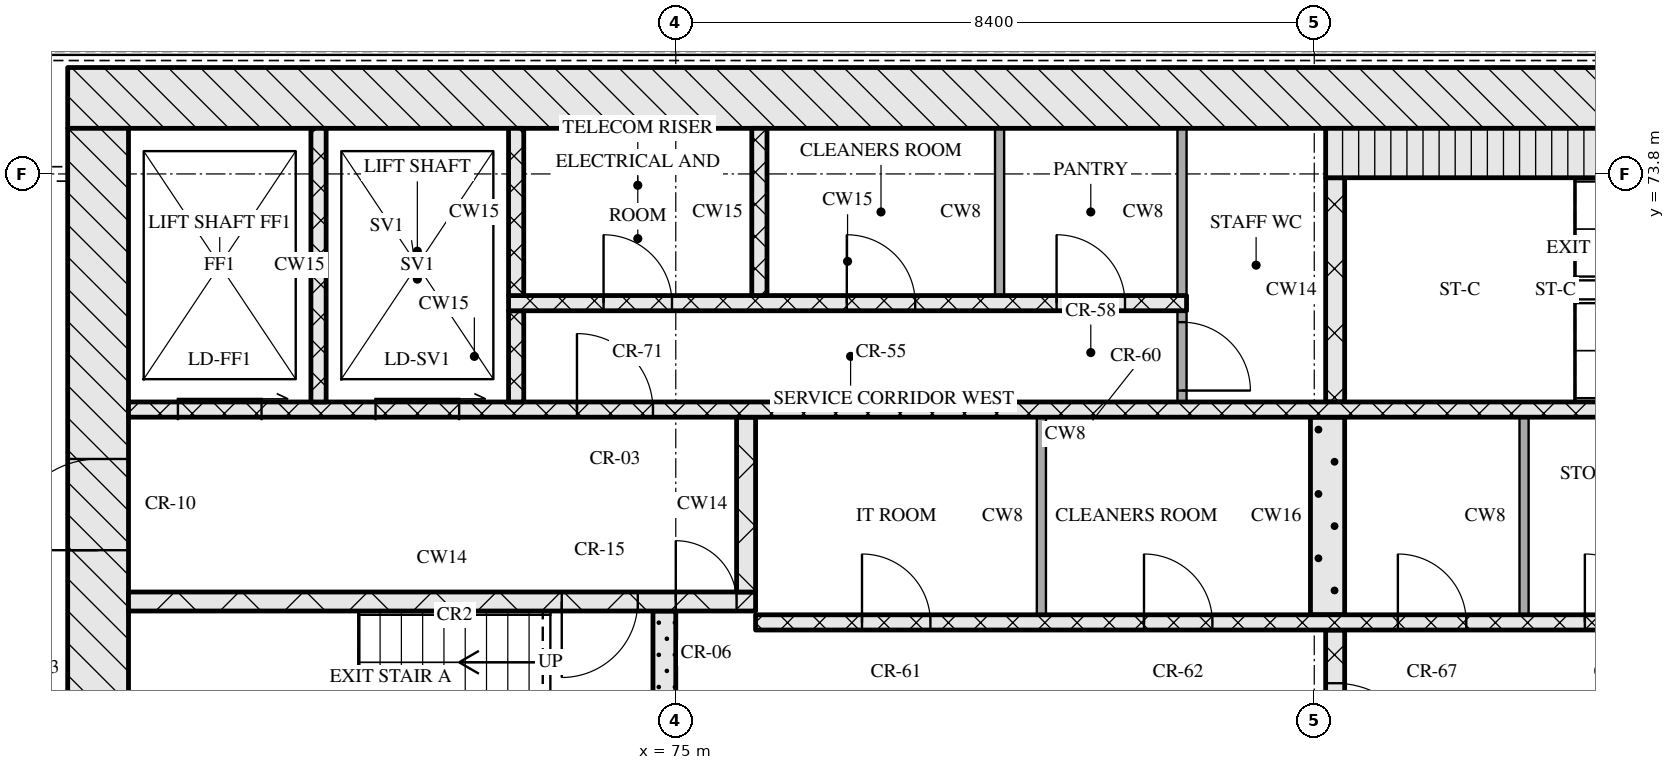
"""IFC4 building model, lengths in metres.
Left out: names, types, materials, properties, quantities, classifications, styles, units other than length and angle.
Written with IfcOpenShell. Run it as: python <this file> out.ifc"""

import sys

from ifc_helpers import new_model, si_unit, direction, frame, frame_2d, origin, place, context, subcontext, project, spatial, rectangle, extrude, element, fill, save


model = new_model("IFC4")
c1 = context("Model", 3, precision=1e-05, world=origin(), true_north=direction((0.0, 1.0)))
c2 = subcontext(c1, "Body", "Model", "MODEL_VIEW")
j1 = project(units=[si_unit("LENGTHUNIT", "METRE"), si_unit("PLANEANGLEUNIT", "RADIAN")], contexts=[c1])
p1 = place(None, origin())
s1 = spatial("IfcSite", under=j1, at=p1, CompositionType="ELEMENT")
p2 = place(p1, origin())
s2 = spatial("IfcBuilding", under=s1, at=p2, CompositionType="ELEMENT")
p3 = place(p2, frame((0.0, 0.0, 154.65)))
s3 = spatial("IfcBuildingStorey", under=s2, at=p3, CompositionType="ELEMENT", Elevation=154.65)
p4 = place(p3, frame((67.0, 74.8, 0.0), z_axis=(0.0, 0.0, 1.0), x_axis=(1.0, 0.0, 0.0)))
e1 = element("IfcWall", 1, at=p4, inside=s3, PredefinedType="SOLIDWALL", context=c2, shape_type="SweptSolid", body=[
    extrude(rectangle(XDim=41.2, YDim=0.8, at=frame_2d((20.6, 0.0))), origin(), (0.0, 0.0, 1.0), 3.32),
])
p5 = place(p3, frame((67.4, 62.4, 0.0), z_axis=(0.0, 0.0, 1.0), x_axis=(0.0, 1.0, 0.0)))
e2 = element("IfcWall", 2, at=p5, inside=s3, PredefinedType="SOLIDWALL", context=c2, shape_type="SweptSolid", body=[
    extrude(rectangle(XDim=12.0, YDim=0.8, at=frame_2d((6.0, 0.0))), origin(), (0.0, 0.0, 1.0), 3.32),
])
p6 = place(p5, frame((6.45, 0.0, 0.0)))
e3 = element("IfcOpeningElement", 3, at=p6, cuts=e2, PredefinedType="OPENING", context=c2, shape_type="SweptSolid", body=[
    extrude(rectangle(XDim=1.2, YDim=2.1, at=frame_2d((0.6, 1.05))), frame((0.0, 0.41, 0.0), z_axis=(0.0, -1.0, 0.0), x_axis=(1.0, 0.0, 0.0)), (0.0, 0.0, 1.0), 0.82),
])
p7 = place(p3, frame((74.85, 65.2, 0.0), z_axis=(0.0, 0.0, 1.0), x_axis=(0.0, 1.0, 0.0)))
e4 = element("IfcWall", 4, at=p7, inside=s3, PredefinedType="SOLIDWALL", context=c2, shape_type="SweptSolid", body=[
    extrude(rectangle(XDim=2.85, YDim=0.3, at=frame_2d((1.425, 0.0))), origin(), (0.0, 0.0, 1.0), 3.32),
])
p8 = place(p3, frame((83.675, 65.2, 0.0), z_axis=(0.0, 0.0, 1.0), x_axis=(0.0, 1.0, 0.0)))
e5 = element("IfcWall", 5, at=p8, inside=s3, PredefinedType="SOLIDWALL", context=c2, shape_type="SweptSolid", body=[
    extrude(rectangle(XDim=2.6, YDim=0.25, at=frame_2d((1.3, 0.0))), origin(), (0.0, 0.0, 1.0), 3.32),
])
p9 = place(p8, frame((0.7, 0.0, 0.0)))
e6 = element("IfcOpeningElement", 6, at=p9, cuts=e5, PredefinedType="OPENING", context=c2, shape_type="SweptSolid", body=[
    extrude(rectangle(XDim=1.2, YDim=2.1, at=frame_2d((0.6, 1.05))), frame((0.0, 0.135, 0.0), z_axis=(0.0, -1.0, 0.0), x_axis=(1.0, 0.0, 0.0)), (0.0, 0.0, 1.0), 0.27),
])
p10 = place(p3, frame((76.05, 67.9, 0.0), z_axis=(0.0, 0.0, 1.0), x_axis=(1.0, 0.0, 0.0)))
e7 = element("IfcWall", 7, at=p10, inside=s3, PredefinedType="SOLIDWALL", context=c2, shape_type="SweptSolid", body=[
    extrude(rectangle(XDim=23.1, YDim=0.2, at=frame_2d((11.55, 0.0))), origin(), (0.0, 0.0, 1.0), 3.32),
])
p11 = place(p10, frame((1.4, 0.0, 0.0)))
e8 = element("IfcOpeningElement", 8, at=p11, cuts=e7, PredefinedType="OPENING", context=c2, shape_type="SweptSolid", body=[
    extrude(rectangle(XDim=0.9, YDim=2.1, at=frame_2d((0.45, 1.05))), frame((0.0, 0.11, 0.0), z_axis=(0.0, -1.0, 0.0), x_axis=(1.0, 0.0, 0.0)), (0.0, 0.0, 1.0), 0.22),
])
p12 = place(p10, frame((5.11, 0.0, 0.0)))
e9 = element("IfcOpeningElement", 9, at=p12, cuts=e7, PredefinedType="OPENING", context=c2, shape_type="SweptSolid", body=[
    extrude(rectangle(XDim=0.9, YDim=2.1, at=frame_2d((0.45, 1.05))), frame((0.0, 0.11, 0.0), z_axis=(0.0, -1.0, 0.0), x_axis=(1.0, 0.0, 0.0)), (0.0, 0.0, 1.0), 0.22),
])
p13 = place(p10, frame((8.45, 0.0, 0.0)))
e10 = element("IfcOpeningElement", 10, at=p13, cuts=e7, PredefinedType="OPENING", context=c2, shape_type="SweptSolid", body=[
    extrude(rectangle(XDim=0.9, YDim=2.1, at=frame_2d((0.45, 1.05))), frame((0.0, 0.11, 0.0), z_axis=(0.0, -1.0, 0.0), x_axis=(1.0, 0.0, 0.0)), (0.0, 0.0, 1.0), 0.22),
])
p14 = place(p10, frame((10.91, 0.0, 0.0)))
e11 = element("IfcOpeningElement", 11, at=p14, cuts=e7, PredefinedType="OPENING", context=c2, shape_type="SweptSolid", body=[
    extrude(rectangle(XDim=0.9, YDim=2.1, at=frame_2d((0.45, 1.05))), frame((0.0, 0.11, 0.0), z_axis=(0.0, -1.0, 0.0), x_axis=(1.0, 0.0, 0.0)), (0.0, 0.0, 1.0), 0.22),
])
p15 = place(p10, frame((13.55, 0.0, 0.0)))
e12 = element("IfcOpeningElement", 12, at=p15, cuts=e7, PredefinedType="OPENING", context=c2, shape_type="SweptSolid", body=[
    extrude(rectangle(XDim=1.0, YDim=2.1, at=frame_2d((0.5, 1.05))), frame((0.0, 0.11, 0.0), z_axis=(0.0, -1.0, 0.0), x_axis=(1.0, 0.0, 0.0)), (0.0, 0.0, 1.0), 0.22),
])
p16 = place(p10, frame((16.2, 0.0, 0.0)))
e13 = element("IfcOpeningElement", 13, at=p16, cuts=e7, PredefinedType="OPENING", context=c2, shape_type="SweptSolid", body=[
    extrude(rectangle(XDim=1.1, YDim=2.1, at=frame_2d((0.55, 1.05))), frame((0.0, 0.11, 0.0), z_axis=(0.0, -1.0, 0.0), x_axis=(1.0, 0.0, 0.0)), (0.0, 0.0, 1.0), 0.22),
])
p17 = place(p10, frame((18.7, 0.0, 0.0)))
e14 = element("IfcOpeningElement", 14, at=p17, cuts=e7, PredefinedType="OPENING", context=c2, shape_type="SweptSolid", body=[
    extrude(rectangle(XDim=1.1, YDim=2.1, at=frame_2d((0.55, 1.05))), frame((0.0, 0.11, 0.0), z_axis=(0.0, -1.0, 0.0), x_axis=(1.0, 0.0, 0.0)), (0.0, 0.0, 1.0), 0.22),
])
p18 = place(p10, frame((21.2, 0.0, 0.0)))
e15 = element("IfcOpeningElement", 15, at=p18, cuts=e7, PredefinedType="OPENING", context=c2, shape_type="SweptSolid", body=[
    extrude(rectangle(XDim=1.1, YDim=2.1, at=frame_2d((0.55, 1.05))), frame((0.0, 0.11, 0.0), z_axis=(0.0, -1.0, 0.0), x_axis=(1.0, 0.0, 0.0)), (0.0, 0.0, 1.0), 0.22),
])
p19 = place(p3, frame((79.81, 68.0, 0.0), z_axis=(0.0, 0.0, 1.0), x_axis=(0.0, 1.0, 0.0)))
e16 = element("IfcWall", 16, at=p19, inside=s3, PredefinedType="PARTITIONING", context=c2, shape_type="SweptSolid", body=[
    extrude(rectangle(XDim=2.6, YDim=0.12, at=frame_2d((1.3, 0.0))), origin(), (0.0, 0.0, 1.0), 3.32),
])
p20 = place(p3, frame((83.575, 68.0, 0.0), z_axis=(0.0, 0.0, 1.0), x_axis=(0.0, 1.0, 0.0)))
e17 = element("IfcWall", 17, at=p20, inside=s3, PredefinedType="SOLIDWALL", context=c2, shape_type="SweptSolid", body=[
    extrude(rectangle(XDim=2.6, YDim=0.45, at=frame_2d((1.3, 0.0))), origin(), (0.0, 0.0, 1.0), 3.32),
])
p21 = place(p3, frame((86.16, 68.0, 0.0), z_axis=(0.0, 0.0, 1.0), x_axis=(0.0, 1.0, 0.0)))
e18 = element("IfcWall", 18, at=p21, inside=s3, PredefinedType="PARTITIONING", context=c2, shape_type="SweptSolid", body=[
    extrude(rectangle(XDim=2.6, YDim=0.12, at=frame_2d((1.3, 0.0))), origin(), (0.0, 0.0, 1.0), 3.32),
])
p22 = place(p3, frame((67.8, 68.175, 0.0), z_axis=(0.0, 0.0, 1.0), x_axis=(1.0, 0.0, 0.0)))
e19 = element("IfcWall", 19, at=p22, inside=s3, PredefinedType="SOLIDWALL", context=c2, shape_type="SweptSolid", body=[
    extrude(rectangle(XDim=8.25, YDim=0.25, at=frame_2d((4.125, 0.0))), origin(), (0.0, 0.0, 1.0), 3.32),
])
p23 = place(p22, frame((5.7, 0.0, 0.0)))
e20 = element("IfcOpeningElement", 20, at=p23, cuts=e19, PredefinedType="OPENING", context=c2, shape_type="SweptSolid", body=[
    extrude(rectangle(XDim=1.0, YDim=2.1, at=frame_2d((0.5, 1.05))), frame((0.0, 0.135, 0.0), z_axis=(0.0, -1.0, 0.0), x_axis=(1.0, 0.0, 0.0)), (0.0, 0.0, 1.0), 0.27),
])
p24 = place(p22, frame((7.2, 0.0, 0.0)))
e21 = element("IfcOpeningElement", 21, at=p24, cuts=e19, PredefinedType="OPENING", context=c2, shape_type="SweptSolid", body=[
    extrude(rectangle(XDim=0.8, YDim=2.1, at=frame_2d((0.4, 1.05))), frame((0.0, 0.135, 0.0), z_axis=(0.0, -1.0, 0.0), x_axis=(1.0, 0.0, 0.0)), (0.0, 0.0, 1.0), 0.27),
])
p25 = place(p3, frame((75.925, 68.3, 0.0), z_axis=(0.0, 0.0, 1.0), x_axis=(0.0, 1.0, 0.0)))
e22 = element("IfcWall", 22, at=p25, inside=s3, PredefinedType="SOLIDWALL", context=c2, shape_type="SweptSolid", body=[
    extrude(rectangle(XDim=2.3, YDim=0.25, at=frame_2d((1.15, 0.0))), origin(), (0.0, 0.0, 1.0), 3.32),
])
p26 = place(p3, frame((67.8, 70.7, 0.0), z_axis=(0.0, 0.0, 1.0), x_axis=(1.0, 0.0, 0.0)))
e23 = element("IfcWall", 23, at=p26, inside=s3, PredefinedType="SOLIDWALL", context=c2, shape_type="SweptSolid", body=[
    extrude(rectangle(XDim=39.6, YDim=0.2, at=frame_2d((19.8, 0.0))), origin(), (0.0, 0.0, 1.0), 3.32),
])
p27 = place(p26, frame((0.65, 0.0, 0.0)))
e24 = element("IfcOpeningElement", 24, at=p27, cuts=e23, PredefinedType="OPENING", context=c2, shape_type="SweptSolid", body=[
    extrude(rectangle(XDim=1.1, YDim=2.1, at=frame_2d((0.55, 1.05))), frame((0.0, 0.11, 0.0), z_axis=(0.0, -1.0, 0.0), x_axis=(1.0, 0.0, 0.0)), (0.0, 0.0, 1.0), 0.22),
])
p28 = place(p26, frame((3.25, 0.0, 0.0)))
e25 = element("IfcOpeningElement", 25, at=p28, cuts=e23, PredefinedType="OPENING", context=c2, shape_type="SweptSolid", body=[
    extrude(rectangle(XDim=1.1, YDim=2.1, at=frame_2d((0.55, 1.05))), frame((0.0, 0.11, 0.0), z_axis=(0.0, -1.0, 0.0), x_axis=(1.0, 0.0, 0.0)), (0.0, 0.0, 1.0), 0.22),
])
p29 = place(p26, frame((5.9, 0.0, 0.0)))
e26 = element("IfcOpeningElement", 26, at=p29, cuts=e23, PredefinedType="OPENING", context=c2, shape_type="SweptSolid", body=[
    extrude(rectangle(XDim=1.0, YDim=2.1, at=frame_2d((0.5, 1.05))), frame((0.0, 0.11, 0.0), z_axis=(0.0, -1.0, 0.0), x_axis=(1.0, 0.0, 0.0)), (0.0, 0.0, 1.0), 0.22),
])
p30 = place(p26, frame((21.7, 0.0, 0.0)))
e27 = element("IfcOpeningElement", 27, at=p30, cuts=e23, PredefinedType="OPENING", context=c2, shape_type="SweptSolid", body=[
    extrude(rectangle(XDim=1.0, YDim=2.1, at=frame_2d((0.5, 1.05))), frame((0.0, 0.11, 0.0), z_axis=(0.0, -1.0, 0.0), x_axis=(1.0, 0.0, 0.0)), (0.0, 0.0, 1.0), 0.22),
])
p31 = place(p26, frame((32.7, 0.0, 0.0)))
e28 = element("IfcOpeningElement", 28, at=p31, cuts=e23, PredefinedType="OPENING", context=c2, shape_type="SweptSolid", body=[
    extrude(rectangle(XDim=1.0, YDim=2.1, at=frame_2d((0.5, 1.05))), frame((0.0, 0.11, 0.0), z_axis=(0.0, -1.0, 0.0), x_axis=(1.0, 0.0, 0.0)), (0.0, 0.0, 1.0), 0.22),
])
p32 = place(p26, frame((35.25, 0.0, 0.0)))
e29 = element("IfcOpeningElement", 29, at=p32, cuts=e23, PredefinedType="OPENING", context=c2, shape_type="SweptSolid", body=[
    extrude(rectangle(XDim=1.1, YDim=2.1, at=frame_2d((0.55, 1.05))), frame((0.0, 0.11, 0.0), z_axis=(0.0, -1.0, 0.0), x_axis=(1.0, 0.0, 0.0)), (0.0, 0.0, 1.0), 0.22),
])
p33 = place(p26, frame((37.85, 0.0, 0.0)))
e30 = element("IfcOpeningElement", 30, at=p33, cuts=e23, PredefinedType="OPENING", context=c2, shape_type="SweptSolid", body=[
    extrude(rectangle(XDim=1.1, YDim=2.1, at=frame_2d((0.55, 1.05))), frame((0.0, 0.11, 0.0), z_axis=(0.0, -1.0, 0.0), x_axis=(1.0, 0.0, 0.0)), (0.0, 0.0, 1.0), 0.22),
])
p34 = place(p3, frame((70.3, 70.8, 0.0), z_axis=(0.0, 0.0, 1.0), x_axis=(0.0, 1.0, 0.0)))
e31 = element("IfcWall", 31, at=p34, inside=s3, PredefinedType="SOLIDWALL", context=c2, shape_type="SweptSolid", body=[
    extrude(rectangle(XDim=3.6, YDim=0.2, at=frame_2d((1.8, 0.0))), origin(), (0.0, 0.0, 1.0), 3.32),
])
p35 = place(p3, frame((72.9, 70.8, 0.0), z_axis=(0.0, 0.0, 1.0), x_axis=(0.0, 1.0, 0.0)))
e32 = element("IfcWall", 32, at=p35, inside=s3, PredefinedType="SOLIDWALL", context=c2, shape_type="SweptSolid", body=[
    extrude(rectangle(XDim=1.2, YDim=0.2, at=frame_2d((0.6, 0.0))), origin(), (0.0, 0.0, 1.0), 3.32),
])
p36 = place(p3, frame((81.66, 70.8, 0.0), z_axis=(0.0, 0.0, 1.0), x_axis=(0.0, 1.0, 0.0)))
e33 = element("IfcWall", 33, at=p36, inside=s3, PredefinedType="PARTITIONING", context=c2, shape_type="SweptSolid", body=[
    extrude(rectangle(XDim=1.2, YDim=0.12, at=frame_2d((0.6, 0.0))), origin(), (0.0, 0.0, 1.0), 3.32),
])
p37 = place(p36, frame((0.15, 0.0, 0.0)))
e34 = element("IfcOpeningElement", 34, at=p37, cuts=e33, PredefinedType="OPENING", context=c2, shape_type="SweptSolid", body=[
    extrude(rectangle(XDim=0.9, YDim=2.1, at=frame_2d((0.45, 1.05))), frame((0.0, 0.07, 0.0), z_axis=(0.0, -1.0, 0.0), x_axis=(1.0, 0.0, 0.0)), (0.0, 0.0, 1.0), 0.14),
])
p38 = place(p3, frame((83.675, 70.8, 0.0), z_axis=(0.0, 0.0, 1.0), x_axis=(0.0, 1.0, 0.0)))
e35 = element("IfcWall", 35, at=p38, inside=s3, PredefinedType="SOLIDWALL", context=c2, shape_type="SweptSolid", body=[
    extrude(rectangle(XDim=2.95, YDim=0.25, at=frame_2d((1.475, 0.0))), origin(), (0.0, 0.0, 1.0), 3.32),
])
p39 = place(p3, frame((72.8, 72.1, 0.0), z_axis=(0.0, 0.0, 1.0), x_axis=(1.0, 0.0, 0.0)))
e36 = element("IfcWall", 36, at=p39, inside=s3, PredefinedType="SOLIDWALL", context=c2, shape_type="SweptSolid", body=[
    extrude(rectangle(XDim=8.92, YDim=0.2, at=frame_2d((4.46, 0.0))), origin(), (0.0, 0.0, 1.0), 3.32),
])
p40 = place(p39, frame((1.25, 0.0, 0.0)))
e37 = element("IfcOpeningElement", 37, at=p40, cuts=e36, PredefinedType="OPENING", context=c2, shape_type="SweptSolid", body=[
    extrude(rectangle(XDim=0.9, YDim=2.1, at=frame_2d((0.45, 1.05))), frame((0.0, 0.11, 0.0), z_axis=(0.0, -1.0, 0.0), x_axis=(1.0, 0.0, 0.0)), (0.0, 0.0, 1.0), 0.22),
])
p41 = place(p39, frame((4.45, 0.0, 0.0)))
e38 = element("IfcOpeningElement", 38, at=p41, cuts=e36, PredefinedType="OPENING", context=c2, shape_type="SweptSolid", body=[
    extrude(rectangle(XDim=0.9, YDim=2.1, at=frame_2d((0.45, 1.05))), frame((0.0, 0.11, 0.0), z_axis=(0.0, -1.0, 0.0), x_axis=(1.0, 0.0, 0.0)), (0.0, 0.0, 1.0), 0.22),
])
p42 = place(p39, frame((7.21, 0.0, 0.0)))
e39 = element("IfcOpeningElement", 39, at=p42, cuts=e36, PredefinedType="OPENING", context=c2, shape_type="SweptSolid", body=[
    extrude(rectangle(XDim=0.9, YDim=2.1, at=frame_2d((0.45, 1.05))), frame((0.0, 0.11, 0.0), z_axis=(0.0, -1.0, 0.0), x_axis=(1.0, 0.0, 0.0)), (0.0, 0.0, 1.0), 0.22),
])
for number, where, z_axis, x_axis in (
    (40, (72.9, 72.2, 0.0), (0.0, 0.0, 1.0), (0.0, 1.0, 0.0)),
    (41, (76.1, 72.2, 0.0), (0.0, 0.0, 1.0), (0.0, 1.0, 0.0)),
):
    element("IfcWall", number, at=place(p3, frame(where, z_axis=z_axis, x_axis=x_axis)), inside=s3, PredefinedType="SOLIDWALL", context=c2, shape_type="SweptSolid", body=[
        extrude(rectangle(XDim=2.2, YDim=0.2, at=frame_2d((1.1, 0.0))), origin(), (0.0, 0.0, 1.0), 3.32),
    ])
for number, where, z_axis, x_axis in (
    (42, (79.26, 72.2, 0.0), (0.0, 0.0, 1.0), (0.0, 1.0, 0.0)),
    (43, (81.66, 72.2, 0.0), (0.0, 0.0, 1.0), (0.0, 1.0, 0.0)),
):
    element("IfcWall", number, at=place(p3, frame(where, z_axis=z_axis, x_axis=x_axis)), inside=s3, PredefinedType="PARTITIONING", context=c2, shape_type="SweptSolid", body=[
        extrude(rectangle(XDim=2.2, YDim=0.12, at=frame_2d((1.1, 0.0))), origin(), (0.0, 0.0, 1.0), 3.32),
    ])
p43 = place(p3, frame((83.55, 74.075, 0.0), z_axis=(0.0, 0.0, 1.0), x_axis=(1.0, 0.0, 0.0)))
e44 = element("IfcWall", 44, at=p43, inside=s3, PredefinedType="SOLIDWALL", context=c2, shape_type="SweptSolid", body=[
    extrude(rectangle(XDim=8.1, YDim=0.65, at=frame_2d((4.05, 0.0))), origin(), (0.0, 0.0, 1.0), 3.32),
])
p44 = place(p9, origin())
e45 = element("IfcDoor", 45, at=p44, inside=s3, OperationType="SINGLE_SWING_RIGHT", PredefinedType="DOOR", context=c2, shape_type="SweptSolid", body=[
    extrude(rectangle(XDim=1.2, YDim=2.1, at=frame_2d((0.6, 1.05))), frame((0.0, 0.025, 0.0), z_axis=(0.0, -1.0, 0.0), x_axis=(1.0, 0.0, 0.0)), (0.0, 0.0, 1.0), 0.05),
])
fill(e6, e45)
p45 = place(p11, origin())
e46 = element("IfcDoor", 46, at=p45, inside=s3, OperationType="SINGLE_SWING_LEFT", PredefinedType="DOOR", context=c2, shape_type="SweptSolid", body=[
    extrude(rectangle(XDim=0.9, YDim=2.1, at=frame_2d((0.45, 1.05))), frame((0.0, 0.025, 0.0), z_axis=(0.0, -1.0, 0.0), x_axis=(1.0, 0.0, 0.0)), (0.0, 0.0, 1.0), 0.05),
])
fill(e8, e46)
p46 = place(p12, origin())
e47 = element("IfcDoor", 47, at=p46, inside=s3, OperationType="SINGLE_SWING_LEFT", PredefinedType="DOOR", context=c2, shape_type="SweptSolid", body=[
    extrude(rectangle(XDim=0.9, YDim=2.1, at=frame_2d((0.45, 1.05))), frame((0.0, 0.025, 0.0), z_axis=(0.0, -1.0, 0.0), x_axis=(1.0, 0.0, 0.0)), (0.0, 0.0, 1.0), 0.05),
])
fill(e9, e47)
p47 = place(p13, origin())
e48 = element("IfcDoor", 48, at=p47, inside=s3, OperationType="SINGLE_SWING_LEFT", PredefinedType="DOOR", context=c2, shape_type="SweptSolid", body=[
    extrude(rectangle(XDim=0.9, YDim=2.1, at=frame_2d((0.45, 1.05))), frame((0.0, 0.025, 0.0), z_axis=(0.0, -1.0, 0.0), x_axis=(1.0, 0.0, 0.0)), (0.0, 0.0, 1.0), 0.05),
])
fill(e10, e48)
p48 = place(p14, origin())
e49 = element("IfcDoor", 49, at=p48, inside=s3, OperationType="SINGLE_SWING_LEFT", PredefinedType="DOOR", context=c2, shape_type="SweptSolid", body=[
    extrude(rectangle(XDim=0.9, YDim=2.1, at=frame_2d((0.45, 1.05))), frame((0.0, 0.025, 0.0), z_axis=(0.0, -1.0, 0.0), x_axis=(1.0, 0.0, 0.0)), (0.0, 0.0, 1.0), 0.05),
])
fill(e11, e49)
p49 = place(p23, origin())
e50 = element("IfcDoor", 50, at=p49, inside=s3, OperationType="SINGLE_SWING_RIGHT", PredefinedType="DOOR", context=c2, shape_type="SweptSolid", body=[
    extrude(rectangle(XDim=1.0, YDim=2.1, at=frame_2d((0.5, 1.05))), frame((0.0, 0.025, 0.0), z_axis=(0.0, -1.0, 0.0), x_axis=(1.0, 0.0, 0.0)), (0.0, 0.0, 1.0), 0.05),
])
fill(e20, e50)
p50 = place(p24, origin())
e51 = element("IfcDoor", 51, at=p50, inside=s3, OperationType="SINGLE_SWING_LEFT", PredefinedType="DOOR", context=c2, shape_type="SweptSolid", body=[
    extrude(rectangle(XDim=0.8, YDim=2.1, at=frame_2d((0.4, 1.05))), frame((0.0, 0.025, 0.0), z_axis=(0.0, -1.0, 0.0), x_axis=(1.0, 0.0, 0.0)), (0.0, 0.0, 1.0), 0.05),
])
fill(e21, e51)
p51 = place(p6, origin())
e52 = element("IfcDoor", 52, at=p51, inside=s3, OperationType="SINGLE_SWING_LEFT", PredefinedType="DOOR", context=c2, shape_type="SweptSolid", body=[
    extrude(rectangle(XDim=1.2, YDim=2.1, at=frame_2d((0.6, 1.05))), frame((0.0, 0.025, 0.0), z_axis=(0.0, -1.0, 0.0), x_axis=(1.0, 0.0, 0.0)), (0.0, 0.0, 1.0), 0.05),
])
fill(e3, e52)
p52 = place(p27, origin())
e53 = element("IfcDoor", 53, at=p52, inside=s3, OperationType="SLIDING_TO_RIGHT", PredefinedType="DOOR", context=c2, shape_type="SweptSolid", body=[
    extrude(rectangle(XDim=1.1, YDim=2.1, at=frame_2d((0.55, 1.05))), frame((0.0, 0.025, 0.0), z_axis=(0.0, -1.0, 0.0), x_axis=(1.0, 0.0, 0.0)), (0.0, 0.0, 1.0), 0.05),
])
fill(e24, e53)
p53 = place(p28, origin())
e54 = element("IfcDoor", 54, at=p53, inside=s3, OperationType="SLIDING_TO_RIGHT", PredefinedType="DOOR", context=c2, shape_type="SweptSolid", body=[
    extrude(rectangle(XDim=1.1, YDim=2.1, at=frame_2d((0.55, 1.05))), frame((0.0, 0.025, 0.0), z_axis=(0.0, -1.0, 0.0), x_axis=(1.0, 0.0, 0.0)), (0.0, 0.0, 1.0), 0.05),
])
fill(e25, e54)
p54 = place(p29, origin())
e55 = element("IfcDoor", 55, at=p54, inside=s3, OperationType="SINGLE_SWING_LEFT", PredefinedType="DOOR", context=c2, shape_type="SweptSolid", body=[
    extrude(rectangle(XDim=1.0, YDim=2.1, at=frame_2d((0.5, 1.05))), frame((0.0, 0.025, 0.0), z_axis=(0.0, -1.0, 0.0), x_axis=(1.0, 0.0, 0.0)), (0.0, 0.0, 1.0), 0.05),
])
fill(e26, e55)
p55 = place(p37, origin())
e56 = element("IfcDoor", 56, at=p55, inside=s3, OperationType="SINGLE_SWING_RIGHT", PredefinedType="DOOR", context=c2, shape_type="SweptSolid", body=[
    extrude(rectangle(XDim=0.9, YDim=2.1, at=frame_2d((0.45, 1.05))), frame((0.0, 0.025, 0.0), z_axis=(0.0, -1.0, 0.0), x_axis=(1.0, 0.0, 0.0)), (0.0, 0.0, 1.0), 0.05),
])
fill(e34, e56)
p56 = place(p40, origin())
e57 = element("IfcDoor", 57, at=p56, inside=s3, OperationType="SINGLE_SWING_LEFT", PredefinedType="DOOR", context=c2, shape_type="SweptSolid", body=[
    extrude(rectangle(XDim=0.9, YDim=2.1, at=frame_2d((0.45, 1.05))), frame((0.0, 0.025, 0.0), z_axis=(0.0, -1.0, 0.0), x_axis=(1.0, 0.0, 0.0)), (0.0, 0.0, 1.0), 0.05),
])
fill(e37, e57)
p57 = place(p41, origin())
e58 = element("IfcDoor", 58, at=p57, inside=s3, OperationType="SINGLE_SWING_LEFT", PredefinedType="DOOR", context=c2, shape_type="SweptSolid", body=[
    extrude(rectangle(XDim=0.9, YDim=2.1, at=frame_2d((0.45, 1.05))), frame((0.0, 0.025, 0.0), z_axis=(0.0, -1.0, 0.0), x_axis=(1.0, 0.0, 0.0)), (0.0, 0.0, 1.0), 0.05),
])
fill(e38, e58)
p58 = place(p42, origin())
e59 = element("IfcDoor", 59, at=p58, inside=s3, OperationType="SINGLE_SWING_LEFT", PredefinedType="DOOR", context=c2, shape_type="SweptSolid", body=[
    extrude(rectangle(XDim=0.9, YDim=2.1, at=frame_2d((0.45, 1.05))), frame((0.0, 0.025, 0.0), z_axis=(0.0, -1.0, 0.0), x_axis=(1.0, 0.0, 0.0)), (0.0, 0.0, 1.0), 0.05),
])
fill(e39, e59)
save(model, sys.argv[1])
